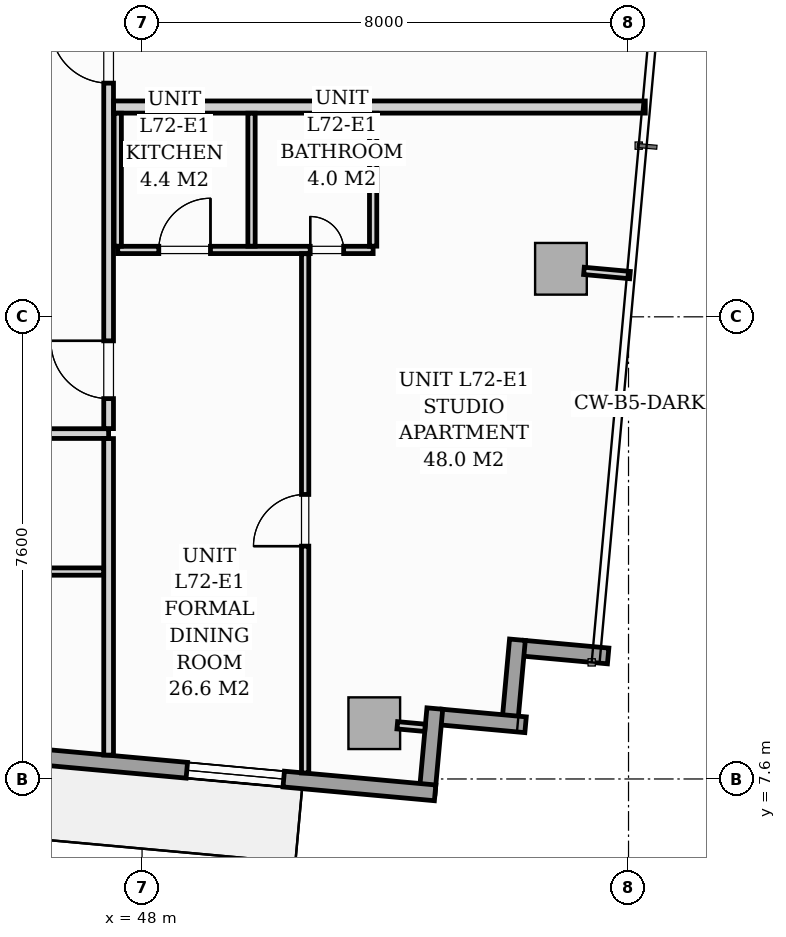
"""IFC4 building model, lengths in metres.
Left out: names, types, materials, properties, quantities, classifications, styles, units other than length and angle.
Written with IfcOpenShell. Run it as: python <this file> out.ifc"""

import sys

from ifc_helpers import new_model, si_unit, direction, frame, frame_2d, origin, origin_2d, place, context, subcontext, project, spatial, rectangle, extrude, source, transform, mapped, element, fill, save


model = new_model("IFC4")
c1 = context("Model", 3, precision=1e-05, world=origin(), true_north=direction((0.0, 1.0)))
c2 = subcontext(c1, "Body", "Model", "MODEL_VIEW")
j1 = project(units=[si_unit("LENGTHUNIT", "METRE"), si_unit("PLANEANGLEUNIT", "RADIAN")], contexts=[c1])
p1 = place(None, origin())
s1 = spatial("IfcSite", under=j1, at=p1, CompositionType="ELEMENT")
p2 = place(p1, origin())
s2 = spatial("IfcBuilding", under=s1, at=p2, CompositionType="ELEMENT")
p3 = place(p2, frame((0.0, 0.0, 249.6)))
s3 = spatial("IfcBuildingStorey", under=s2, at=p3, CompositionType="ELEMENT", Elevation=249.6)
m1 = source(origin(), c2, "Body", "SweptSolid", [
    extrude(rectangle(XDim=0.85, YDim=0.85, at=origin_2d()), origin(), (0.0, 0.0, 1.0), 3.296),
])
for number, where, z_axis, x_axis in (
    (1, (51.819, 8.517, 0.002), (0.0, 0.0, 1.0), (0.996, -0.091, 0.0)),
    (2, (54.889, 15.99, 0.002), (0.0, 0.0, 1.0), (0.996, -0.091, 0.0)),
):
    element("IfcColumn", number, at=place(p3, frame(where, z_axis=z_axis, x_axis=x_axis)), inside=s3, PredefinedType="COLUMN", context=c2, shape_type="MappedRepresentation", body=[
        mapped(m1, transform((0.0, 0.0, 0.0), scale=1.0)),
    ])
for number, where, z_axis, x_axis in (
    (3, (55.665, 9.623, 0.0), (0.0, 0.0, 1.0), (-0.996, 0.091, 0.0)),
    (4, (54.173, 9.889, 0.0), (0.0, 0.0, 1.0), (-0.091, -0.996, 0.0)),
):
    element("IfcWall", number, at=place(p3, frame(where, z_axis=z_axis, x_axis=x_axis)), inside=s3, PredefinedType="STANDARD", context=c2, shape_type="SweptSolid", body=[
        extrude(rectangle(XDim=1.395, YDim=0.26, at=frame_2d((0.698, 0.0))), origin(), (0.0, 0.0, 1.0), 3.04),
    ])
for number, where, z_axis, x_axis in (
    (5, (54.307, 8.492, 0.0), (0.0, 0.0, 1.0), (-0.996, 0.091, 0.0)),
    (6, (52.815, 8.758, 0.0), (0.0, 0.0, 1.0), (-0.091, -0.996, 0.0)),
):
    element("IfcWall", number, at=place(p3, frame(where, z_axis=z_axis, x_axis=x_axis)), inside=s3, PredefinedType="STANDARD", context=c2, shape_type="SweptSolid", body=[
        extrude(rectangle(XDim=1.395, YDim=0.26, at=frame_2d((0.698, 0.0))), origin(), (0.0, 0.0, 1.0), 3.04),
    ])
p4 = place(p3, frame((52.819, 7.372, 0.0), z_axis=(0.0, 0.0, 1.0), x_axis=(-0.995884447498, 0.090632043071, 0.0)))
e7 = element("IfcWall", 7, at=p4, inside=s3, PredefinedType="STANDARD", context=c2, shape_type="SweptSolid", body=[
    extrude(rectangle(XDim=14.63, YDim=0.26, at=frame_2d((7.315, 0.0))), origin(), (0.0, 0.0, 1.0), 3.04),
])
p5 = place(p4, frame((7.145, 0.0, 0.0)))
e8 = element("IfcOpeningElement", 8, at=p5, cuts=e7, PredefinedType="OPENING", context=c2, shape_type="SweptSolid", body=[
    extrude(rectangle(XDim=1.8, YDim=2.06, at=frame_2d((0.9, 1.03))), frame((0.0, 0.14, 0.0), z_axis=(0.0, -1.0, 0.0), x_axis=(1.0, 0.0, 0.0)), (0.0, 0.0, 1.0), 0.28),
])
p6 = place(p4, frame((2.5, 0.0, 0.65)))
e9 = element("IfcOpeningElement", 9, at=p6, cuts=e7, PredefinedType="OPENING", context=c2, shape_type="SweptSolid", body=[
    extrude(rectangle(XDim=1.6, YDim=1.5, at=frame_2d((0.8, 0.75))), frame((0.0, 0.14, 0.0), z_axis=(0.0, -1.0, 0.0), x_axis=(1.0, 0.0, 0.0)), (0.0, 0.0, 1.0), 0.28),
])
p7 = place(p3, frame((24.55, 13.28, 0.0), z_axis=(0.0, 0.0, 1.0), x_axis=(1.0, 0.0, 0.0)))
e10 = element("IfcWall", 10, at=p7, inside=s3, PredefinedType="PARTITIONING", context=c2, shape_type="SweptSolid", body=[
    extrude(rectangle(XDim=22.9, YDim=0.16, at=frame_2d((11.45, 0.0))), origin(), (0.0, 0.0, 1.0), 2.596),
])
p8 = place(p7, frame((7.125, 0.0, 0.0)))
e11 = element("IfcOpeningElement", 11, at=p8, cuts=e10, PredefinedType="OPENING", context=c2, shape_type="SweptSolid", body=[
    extrude(rectangle(XDim=0.95, YDim=2.06, at=frame_2d((0.475, 1.03))), frame((0.0, 0.09, 0.0), z_axis=(0.0, -1.0, 0.0), x_axis=(1.0, 0.0, 0.0)), (0.0, 0.0, 1.0), 0.18),
])
p9 = place(p3, frame((47.45, 7.993, 0.0), z_axis=(0.0, 0.0, 1.0), x_axis=(0.0, 1.0, 0.0)))
e12 = element("IfcWall", 12, at=p9, inside=s3, PredefinedType="PARTITIONING", context=c2, shape_type="SweptSolid", body=[
    extrude(rectangle(XDim=5.205, YDim=0.16, at=frame_2d((2.603, 0.0))), origin(), (0.0, 0.0, 1.0), 3.04),
])
p10 = place(p3, frame((47.45, 13.362, 0.0), z_axis=(0.0, 0.0, 1.0), x_axis=(0.0, 1.0, 0.0)))
e13 = element("IfcWall", 13, at=p10, inside=s3, PredefinedType="PARTITIONING", context=c2, shape_type="SweptSolid", body=[
    extrude(rectangle(XDim=7.288, YDim=0.16, at=frame_2d((3.644, 0.0))), origin(), (0.0, 0.0, 1.0), 3.04),
])
p11 = place(p10, frame((0.493, 0.0, 0.0)))
e14 = element("IfcOpeningElement", 14, at=p11, cuts=e13, PredefinedType="OPENING", context=c2, shape_type="SweptSolid", body=[
    extrude(rectangle(XDim=0.95, YDim=2.06, at=frame_2d((0.475, 1.03))), frame((0.0, 0.09, 0.0), z_axis=(0.0, -1.0, 0.0), x_axis=(1.0, 0.0, 0.0)), (0.0, 0.0, 1.0), 0.18),
])
p12 = place(p10, frame((5.681, 0.0, 0.0)))
e15 = element("IfcOpeningElement", 15, at=p12, cuts=e13, PredefinedType="OPENING", context=c2, shape_type="SweptSolid", body=[
    extrude(rectangle(XDim=0.95, YDim=2.06, at=frame_2d((0.475, 1.03))), frame((0.0, 0.09, 0.0), z_axis=(0.0, -1.0, 0.0), x_axis=(1.0, 0.0, 0.0)), (0.0, 0.0, 1.0), 0.18),
])
p13 = place(p3, frame((43.682, 11.011, 0.0), z_axis=(0.0, 0.0, 1.0), x_axis=(1.0, 0.0, 0.0)))
e16 = element("IfcWall", 16, at=p13, inside=s3, PredefinedType="PARTITIONING", context=c2, shape_type="SweptSolid", body=[
    extrude(rectangle(XDim=3.686, YDim=0.12, at=frame_2d((1.843, 0.0))), origin(), (0.0, 0.0, 1.0), 3.04),
])
p14 = place(p13, frame((1.413, 0.0, 0.0)))
e17 = element("IfcOpeningElement", 17, at=p14, cuts=e16, PredefinedType="OPENING", context=c2, shape_type="SweptSolid", body=[
    extrude(rectangle(XDim=0.8, YDim=2.02, at=frame_2d((0.4, 1.01))), frame((0.0, 0.07, 0.0), z_axis=(0.0, -1.0, 0.0), x_axis=(1.0, 0.0, 0.0)), (0.0, 0.0, 1.0), 0.14),
])
p15 = place(p3, frame((47.532, 18.65, 0.0), z_axis=(0.0, 0.0, 1.0), x_axis=(1.0, 0.0, 0.0)))
e18 = element("IfcWall", 18, at=p15, inside=s3, PredefinedType="PARTITIONING", context=c2, shape_type="SweptSolid", body=[
    extrude(rectangle(XDim=8.743, YDim=0.2, at=frame_2d((4.372, 0.0))), origin(), (0.0, 0.0, 1.0), 3.04),
])
p16 = place(p3, frame((47.6, 16.3, 0.0), z_axis=(0.0, 0.0, 1.0), x_axis=(1.0, 0.0, 0.0)))
e19 = element("IfcWall", 19, at=p16, inside=s3, PredefinedType="PARTITIONING", context=c2, shape_type="SweptSolid", body=[
    extrude(rectangle(XDim=4.2, YDim=0.12, at=frame_2d((2.1, 0.0))), origin(), (0.0, 0.0, 1.0), 2.381),
])
p17 = place(p16, frame((0.675, 0.0, 0.0)))
e20 = element("IfcOpeningElement", 20, at=p17, cuts=e19, PredefinedType="OPENING", context=c2, shape_type="SweptSolid", body=[
    extrude(rectangle(XDim=0.85, YDim=2.05, at=frame_2d((0.425, 1.025))), frame((0.0, 0.07, 0.0), z_axis=(0.0, -1.0, 0.0), x_axis=(1.0, 0.0, 0.0)), (0.0, 0.0, 1.0), 0.14),
])
p18 = place(p16, frame((3.165, 0.0, 0.0)))
e21 = element("IfcOpeningElement", 21, at=p18, cuts=e19, PredefinedType="OPENING", context=c2, shape_type="SweptSolid", body=[
    extrude(rectangle(XDim=0.55, YDim=2.0, at=frame_2d((0.275, 1.0))), frame((0.0, 0.07, 0.0), z_axis=(0.0, -1.0, 0.0), x_axis=(1.0, 0.0, 0.0)), (0.0, 0.0, 1.0), 0.14),
])
for number, where, z_axis, x_axis in (
    (22, (47.6, 16.362, 0.0), (0.0, 0.0, 1.0), (0.0, 1.0, 0.0)),
    (23, (49.8, 16.362, 0.0), (0.0, 0.0, 1.0), (0.0, 1.0, 0.0)),
    (24, (51.8, 16.362, 0.0), (0.0, 0.0, 1.0), (0.0, 1.0, 0.0)),
):
    element("IfcWall", number, at=place(p3, frame(where, z_axis=z_axis, x_axis=x_axis)), inside=s3, PredefinedType="PARTITIONING", context=c2, shape_type="SweptSolid", body=[
        extrude(rectangle(XDim=2.186, YDim=0.12, at=frame_2d((1.093, 0.0))), origin(), (0.0, 0.0, 1.0), 3.04),
    ])
p19 = place(p3, frame((50.682, 7.699, 0.0), z_axis=(0.0, 0.0, 1.0), x_axis=(0.0, 1.0, 0.0)))
e25 = element("IfcWall", 25, at=p19, inside=s3, PredefinedType="PARTITIONING", context=c2, shape_type="SweptSolid", body=[
    extrude(rectangle(XDim=8.539, YDim=0.12, at=frame_2d((4.27, 0.0))), origin(), (0.0, 0.0, 1.0), 3.04),
])
p20 = place(p19, frame((3.73, 0.0, 0.0)))
e26 = element("IfcOpeningElement", 26, at=p20, cuts=e25, PredefinedType="OPENING", context=c2, shape_type="SweptSolid", body=[
    extrude(rectangle(XDim=0.85, YDim=2.05, at=frame_2d((0.425, 1.025))), frame((0.0, 0.07, 0.0), z_axis=(0.0, -1.0, 0.0), x_axis=(1.0, 0.0, 0.0)), (0.0, 0.0, 1.0), 0.14),
])
p21 = place(p3, frame((52.197, 8.483, 0.0), z_axis=(0.0, 0.0, 1.0), x_axis=(0.995884462012, -0.090631883588, 0.0)))
e27 = element("IfcWall", 27, at=p21, inside=s3, PredefinedType="PARTITIONING", context=c2, shape_type="SweptSolid", body=[
    extrude(rectangle(XDim=0.458, YDim=0.12, at=frame_2d((0.229, 0.0))), origin(), (0.0, 0.0, 1.0), 3.04),
])
p22 = place(p3, frame((55.267, 15.955, 0.0), z_axis=(0.0, 0.0, 1.0), x_axis=(0.995887938321, -0.09059367697, 0.0)))
e28 = element("IfcWall", 28, at=p22, inside=s3, PredefinedType="PARTITIONING", context=c2, shape_type="SweptSolid", body=[
    extrude(rectangle(XDim=0.76, YDim=0.12, at=frame_2d((0.38, 0.0))), origin(), (0.0, 0.0, 1.0), 3.04),
])
m2 = source(origin(), c2, "Body", "SweptSolid", [
    extrude(rectangle(XDim=1.6, YDim=1.5, at=frame_2d((0.8, 0.75))), frame((0.0, 0.03, 0.0), z_axis=(0.0, -1.0, 0.0), x_axis=(1.0, 0.0, 0.0)), (0.0, 0.0, 1.0), 0.06),
])
p23 = place(p6, origin())
e29 = element("IfcWindow", 29, at=p23, inside=s3, PartitioningType="SINGLE_PANEL", PredefinedType="WINDOW", context=c2, shape_type="MappedRepresentation", body=[
    mapped(m2, transform((0.0, 0.0, 0.0), scale=1.0)),
])
fill(e9, e29)
m3 = source(origin(), c2, "Body", "SweptSolid", [
    extrude(rectangle(XDim=0.95, YDim=2.06, at=frame_2d((0.475, 1.03))), frame((0.0, 0.025, 0.0), z_axis=(0.0, -1.0, 0.0), x_axis=(1.0, 0.0, 0.0)), (0.0, 0.0, 1.0), 0.05),
])
p24 = place(p11, origin())
e30 = element("IfcDoor", 30, at=p24, inside=s3, OperationType="SINGLE_SWING_RIGHT", PredefinedType="DOOR", context=c2, shape_type="MappedRepresentation", body=[
    mapped(m3, transform((0.0, 0.0, 0.0), scale=1.0)),
])
fill(e14, e30)
m4 = source(origin(), c2, "Body", "SweptSolid", [
    extrude(rectangle(XDim=0.85, YDim=2.05, at=frame_2d((0.425, 1.025))), frame((0.0, 0.025, 0.0), z_axis=(0.0, -1.0, 0.0), x_axis=(1.0, 0.0, 0.0)), (0.0, 0.0, 1.0), 0.05),
])
p25 = place(p20, origin())
e31 = element("IfcDoor", 31, at=p25, inside=s3, OperationType="SINGLE_SWING_LEFT", PredefinedType="DOOR", context=c2, shape_type="MappedRepresentation", body=[
    mapped(m4, transform((0.0, 0.0, 0.0), scale=1.0)),
])
fill(e26, e31)
p26 = place(p17, origin())
e32 = element("IfcDoor", 32, at=p26, inside=s3, OperationType="SINGLE_SWING_RIGHT", PredefinedType="DOOR", context=c2, shape_type="MappedRepresentation", body=[
    mapped(m4, transform((0.0, 0.0, 0.0), scale=1.0)),
])
fill(e20, e32)
m5 = source(origin(), c2, "Body", "SweptSolid", [
    extrude(rectangle(XDim=0.55, YDim=2.0, at=frame_2d((0.275, 1.0))), frame((0.0, 0.025, 0.0), z_axis=(0.0, -1.0, 0.0), x_axis=(1.0, 0.0, 0.0)), (0.0, 0.0, 1.0), 0.05),
])
p27 = place(p18, origin())
e33 = element("IfcDoor", 33, at=p27, inside=s3, OperationType="SINGLE_SWING_LEFT", PredefinedType="DOOR", context=c2, shape_type="MappedRepresentation", body=[
    mapped(m5, transform((0.0, 0.0, 0.0), scale=1.0)),
])
fill(e21, e33)
p28 = place(p12, origin())
e34 = element("IfcDoor", 34, at=p28, inside=s3, OperationType="SINGLE_SWING_RIGHT", PredefinedType="DOOR", context=c2, shape_type="MappedRepresentation", body=[
    mapped(m3, transform((0.0, 0.0, 0.0), scale=1.0)),
])
fill(e15, e34)
save(model, sys.argv[1])
